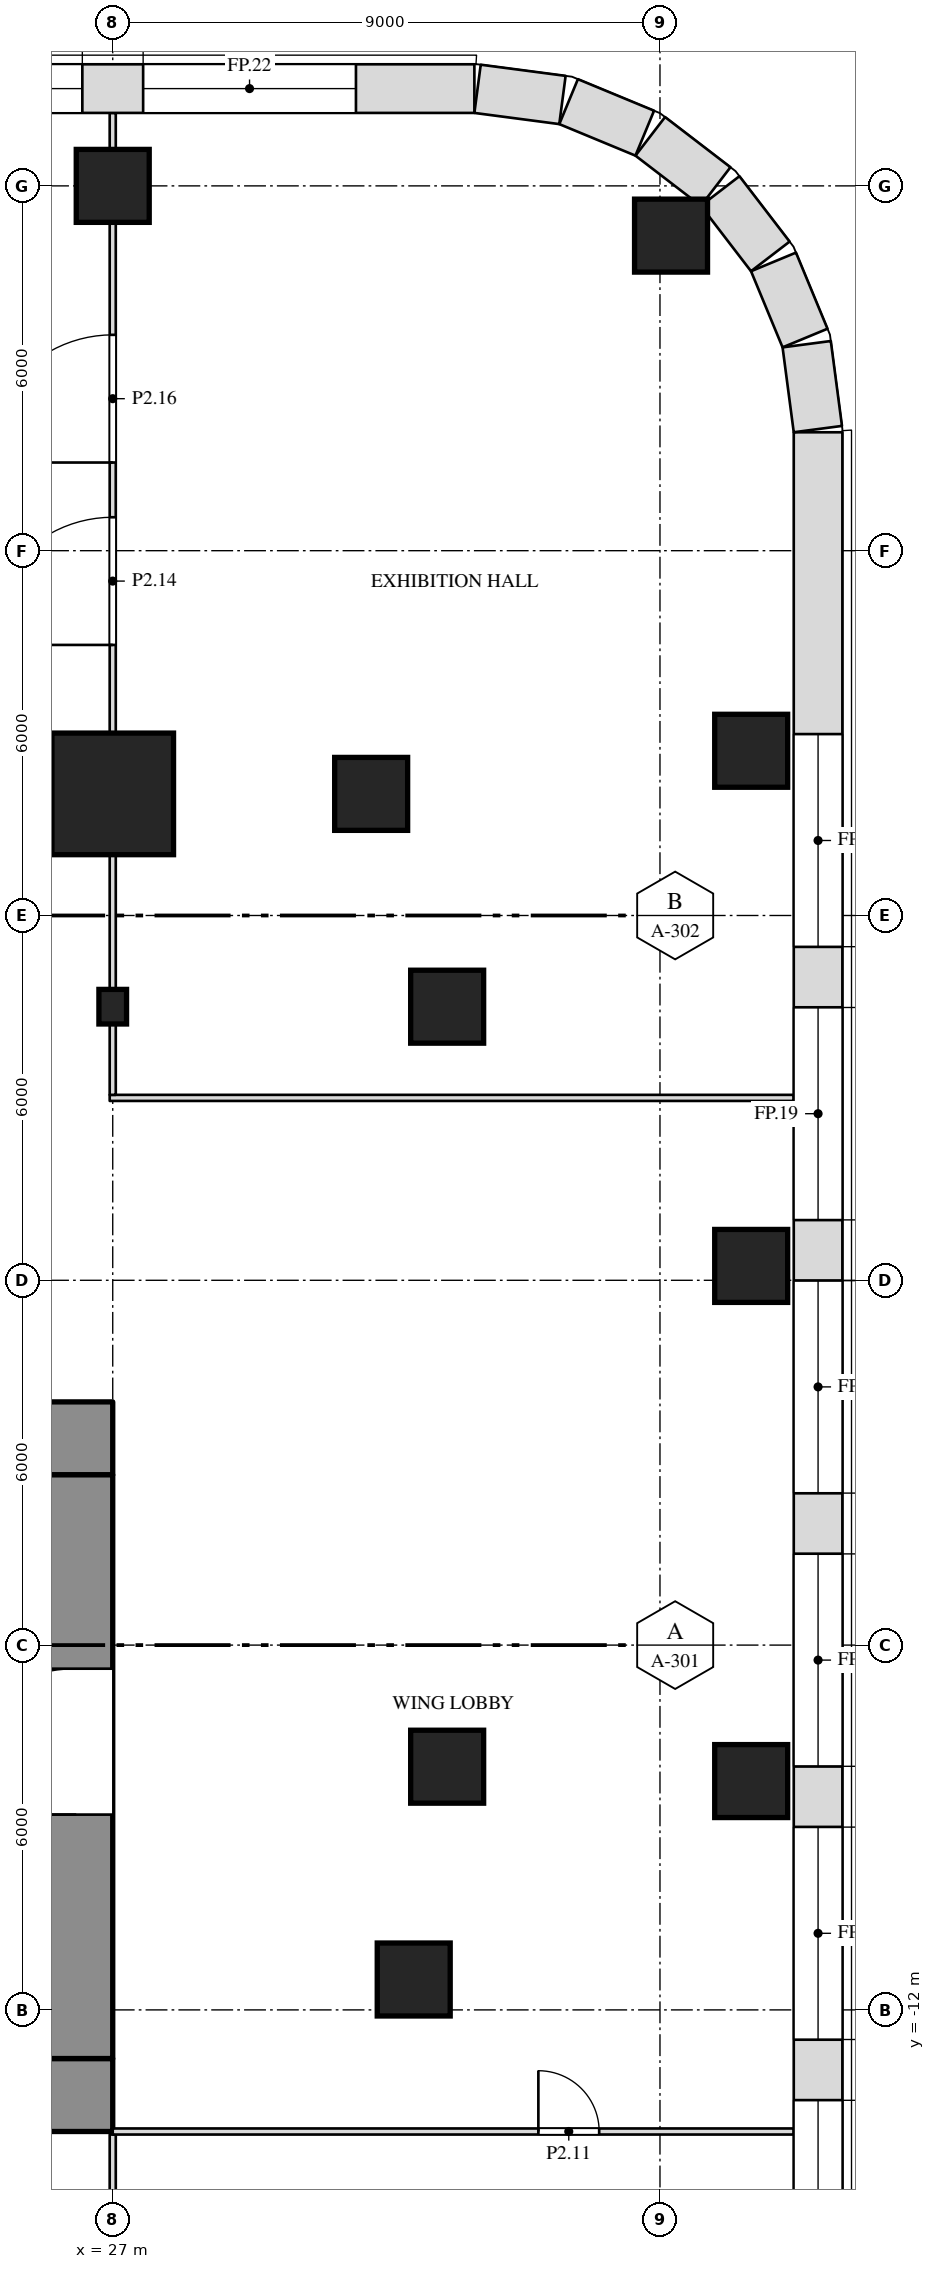
"""IFC4 building model, lengths in metres.
Left out: names, types, materials, properties, quantities, classifications, styles, units other than length and angle.
Written with IfcOpenShell. Run it as: python <this file> out.ifc"""

import sys

from ifc_helpers import new_model, si_unit, direction, frame, frame_2d, origin, origin_2d, place, context, subcontext, project, spatial, rectangle, i_section, extrude, element, fill, save


model = new_model("IFC4")
c1 = context("Model", 3, precision=1e-05, world=origin(), true_north=direction((0.0, 1.0)))
c2 = subcontext(c1, "Body", "Model", "MODEL_VIEW")
j1 = project(units=[si_unit("LENGTHUNIT", "METRE"), si_unit("PLANEANGLEUNIT", "RADIAN")], contexts=[c1])
p1 = place(None, origin())
s1 = spatial("IfcSite", under=j1, at=p1, CompositionType="ELEMENT")
p2 = place(p1, origin())
s2 = spatial("IfcBuilding", under=s1, at=p2, CompositionType="ELEMENT")
p3 = place(p2, frame((0.0, 0.0, 15.0)))
s3 = spatial("IfcBuildingStorey", under=s2, at=p3, CompositionType="ELEMENT", Elevation=15.0)
for number, where, z_axis, x_axis in (
    (1, (31.95, -11.5, 0.0), (0.0, 0.0, 1.0), (1.0, 0.0, 0.0)),
    (2, (37.5, -8.236, 0.0), (0.0, 0.0, 1.0), (1.0, 0.0, 0.0)),
    (3, (32.5, -8.0, 0.0), (0.0, 0.0, 1.0), (1.0, 0.0, 0.0)),
    (4, (37.5, 0.236, 0.0), (0.0, 0.0, 1.0), (1.0, 0.0, 0.0)),
):
    element("IfcColumn", number, at=place(p3, frame(where, z_axis=z_axis, x_axis=x_axis)), inside=s3, PredefinedType="COLUMN", context=c2, shape_type="SweptSolid", body=[
        extrude(rectangle(XDim=1.2, YDim=1.2, at=origin_2d()), origin(), (0.0, 0.0, 1.0), 6.0),
    ])
p4 = place(p3, frame((27.0, 4.5, 0.0), z_axis=(0.0, 0.0, 1.0), x_axis=(1.0, 0.0, 0.0)))
e5 = element("IfcColumn", 5, at=p4, inside=s3, PredefinedType="COLUMN", context=c2, shape_type="SweptSolid", body=[
    extrude(i_section(OverallWidth=0.455, OverallDepth=0.569, WebThickness=0.078, FlangeThickness=0.125, at=origin_2d()), origin(), (0.0, 0.0, 1.0), 6.0),
])
p5 = place(p3, frame((32.5, 4.5, 0.0), z_axis=(0.0, 0.0, 1.0), x_axis=(1.0, 0.0, 0.0)))
e6 = element("IfcColumn", 6, at=p5, inside=s3, PredefinedType="COLUMN", context=c2, shape_type="SweptSolid", body=[
    extrude(rectangle(XDim=1.2, YDim=1.2, at=origin_2d()), origin(), (0.0, 0.0, 1.0), 6.0),
])
p6 = place(p3, frame((27.0, 8.0, 0.0), z_axis=(0.0, 0.0, 1.0), x_axis=(1.0, 0.0, 0.0)))
e7 = element("IfcColumn", 7, at=p6, inside=s3, PredefinedType="COLUMN", context=c2, shape_type="SweptSolid", body=[
    extrude(rectangle(XDim=2.0, YDim=2.0, at=origin_2d()), origin(), (0.0, 0.0, 1.0), 6.0),
])
for number, where, z_axis, x_axis in (
    (8, (31.25, 8.0, 0.0), (0.0, 0.0, 1.0), (1.0, 0.0, 0.0)),
    (9, (37.5, 8.709, 0.0), (0.0, 0.0, 1.0), (1.0, 0.0, 0.0)),
    (10, (36.182, 17.182, 0.0), (0.0, 0.0, 1.0), (1.0, 0.0, 0.0)),
    (11, (27.0, 18.0, 0.0), (0.0, 0.0, 1.0), (1.0, 0.0, 0.0)),
):
    element("IfcColumn", number, at=place(p3, frame(where, z_axis=z_axis, x_axis=x_axis)), inside=s3, PredefinedType="COLUMN", context=c2, shape_type="SweptSolid", body=[
        extrude(rectangle(XDim=1.2, YDim=1.2, at=origin_2d()), origin(), (0.0, 0.0, 1.0), 6.0),
    ])
p7 = place(p3, frame((-27.0, -2.6, 0.0), z_axis=(0.0, 0.0, 1.0), x_axis=(1.0, 0.0, 0.0)))
e12 = element("IfcWall", 12, at=p7, inside=s3, PredefinedType="SHEAR", context=c2, shape_type="SweptSolid", body=[
    extrude(rectangle(XDim=54.0, YDim=1.2, at=frame_2d((27.0, 0.0))), origin(), (0.0, 0.0, 1.0), 5.7),
])
p8 = place(p3, frame((-27.0, -13.4, 0.0), z_axis=(0.0, 0.0, 1.0), x_axis=(1.0, 0.0, 0.0)))
e13 = element("IfcWall", 13, at=p8, inside=s3, PredefinedType="SHEAR", context=c2, shape_type="SweptSolid", body=[
    extrude(rectangle(XDim=54.0, YDim=1.2, at=frame_2d((27.0, 0.0))), origin(), (0.0, 0.0, 1.0), 5.7),
])
p9 = place(p8, frame((16.45, 0.0, 0.0)))
e14 = element("IfcOpeningElement", 14, at=p9, cuts=e13, PredefinedType="OPENING", context=c2, shape_type="SweptSolid", body=[
    extrude(rectangle(XDim=1.0, YDim=2.1, at=frame_2d((0.5, 1.05))), frame((0.0, 0.612, 0.0), z_axis=(0.0, -1.0, 0.0), x_axis=(1.0, 0.0, 0.0)), (0.0, 0.0, 1.0), 1.224),
])
p10 = place(p8, frame((36.55, 0.0, 0.0)))
e15 = element("IfcOpeningElement", 15, at=p10, cuts=e13, PredefinedType="OPENING", context=c2, shape_type="SweptSolid", body=[
    extrude(rectangle(XDim=1.0, YDim=2.1, at=frame_2d((0.5, 1.05))), frame((0.0, 0.612, 0.0), z_axis=(0.0, -1.0, 0.0), x_axis=(1.0, 0.0, 0.0)), (0.0, 0.0, 1.0), 1.224),
])
p11 = place(p3, frame((26.4, -12.8, 0.0), z_axis=(0.0, 0.0, 1.0), x_axis=(0.0, 1.0, 0.0)))
e16 = element("IfcWall", 16, at=p11, inside=s3, PredefinedType="SHEAR", context=c2, shape_type="SweptSolid", body=[
    extrude(rectangle(XDim=9.6, YDim=1.2, at=frame_2d((4.8, 0.0))), origin(), (0.0, 0.0, 1.0), 5.7),
])
p12 = place(p11, frame((4.012, 0.0, 0.0)))
e17 = element("IfcOpeningElement", 17, at=p12, cuts=e16, PredefinedType="OPENING", context=c2, shape_type="SweptSolid", body=[
    extrude(rectangle(XDim=2.4, YDim=2.1, at=frame_2d((1.2, 1.05))), frame((0.0, 0.612, 0.0), z_axis=(0.0, -1.0, 0.0), x_axis=(1.0, 0.0, 0.0)), (0.0, 0.0, 1.0), 1.224),
])
p13 = place(p3, frame((27.0, -16.9, 0.0), z_axis=(0.0, 0.0, 1.0), x_axis=(0.0, 1.0, 0.0)))
e18 = element("IfcWall", 18, at=p13, inside=s3, PredefinedType="PARTITIONING", context=c2, shape_type="SweptSolid", body=[
    extrude(rectangle(XDim=2.85, YDim=0.1, at=frame_2d((1.425, 0.0))), origin(), (0.0, 0.0, 1.0), 5.088),
])
p14 = place(p3, frame((27.0, -14.0, 0.0), z_axis=(0.0, 0.0, 1.0), x_axis=(1.0, 0.0, 0.0)))
e19 = element("IfcWall", 19, at=p14, inside=s3, PredefinedType="PARTITIONING", context=c2, shape_type="SweptSolid", body=[
    extrude(rectangle(XDim=11.2, YDim=0.1, at=frame_2d((5.6, 0.0))), origin(), (0.0, 0.0, 1.0), 5.7),
])
p15 = place(p14, frame((7.0, 0.0, 0.0)))
e20 = element("IfcOpeningElement", 20, at=p15, cuts=e19, PredefinedType="OPENING", context=c2, shape_type="SweptSolid", body=[
    extrude(rectangle(XDim=1.0, YDim=2.1, at=frame_2d((0.5, 1.05))), frame((0.0, 0.062, 0.0), z_axis=(0.0, -1.0, 0.0), x_axis=(1.0, 0.0, 0.0)), (0.0, 0.0, 1.0), 0.124),
])
p16 = place(p3, frame((26.95, 3.0, 0.0), z_axis=(0.0, 0.0, 1.0), x_axis=(1.0, 0.0, 0.0)))
e21 = element("IfcWall", 21, at=p16, inside=s3, PredefinedType="PARTITIONING", context=c2, shape_type="SweptSolid", body=[
    extrude(rectangle(XDim=11.25, YDim=0.1, at=frame_2d((5.625, 0.0))), origin(), (0.0, 0.0, 1.0), 5.7),
])
p17 = place(p3, frame((27.0, 3.05, 0.0), z_axis=(0.0, 0.0, 1.0), x_axis=(0.0, 1.0, 0.0)))
e22 = element("IfcWall", 22, at=p17, inside=s3, PredefinedType="PARTITIONING", context=c2, shape_type="SweptSolid", body=[
    extrude(rectangle(XDim=1.166, YDim=0.1, at=frame_2d((0.583, 0.0))), origin(), (0.0, 0.0, 1.0), 5.088),
])
p18 = place(p3, frame((27.0, 4.784, 0.0), z_axis=(0.0, 0.0, 1.0), x_axis=(0.0, 1.0, 0.0)))
e23 = element("IfcWall", 23, at=p18, inside=s3, PredefinedType="PARTITIONING", context=c2, shape_type="SweptSolid", body=[
    extrude(rectangle(XDim=2.216, YDim=0.1, at=frame_2d((1.108, 0.0))), origin(), (0.0, 0.0, 1.0), 5.088),
])
p19 = place(p3, frame((27.0, 9.0, 0.0), z_axis=(0.0, 0.0, 1.0), x_axis=(0.0, 1.0, 0.0)))
e24 = element("IfcWall", 24, at=p19, inside=s3, PredefinedType="PARTITIONING", context=c2, shape_type="SweptSolid", body=[
    extrude(rectangle(XDim=8.4, YDim=0.1, at=frame_2d((4.2, 0.0))), origin(), (0.0, 0.0, 1.0), 5.088),
])
p20 = place(p19, frame((1.45, 0.0, 0.0)))
e25 = element("IfcOpeningElement", 25, at=p20, cuts=e24, PredefinedType="OPENING", context=c2, shape_type="SweptSolid", body=[
    extrude(rectangle(XDim=2.1, YDim=2.4, at=frame_2d((1.05, 1.2))), frame((0.0, 0.062, 0.0), z_axis=(0.0, -1.0, 0.0), x_axis=(1.0, 0.0, 0.0)), (0.0, 0.0, 1.0), 0.124),
])
p21 = place(p19, frame((4.45, 0.0, 0.0)))
e26 = element("IfcOpeningElement", 26, at=p21, cuts=e24, PredefinedType="OPENING", context=c2, shape_type="SweptSolid", body=[
    extrude(rectangle(XDim=2.1, YDim=2.4, at=frame_2d((1.05, 1.2))), frame((0.0, 0.062, 0.0), z_axis=(0.0, -1.0, 0.0), x_axis=(1.0, 0.0, 0.0)), (0.0, 0.0, 1.0), 0.124),
])
p22 = place(p3, frame((27.0, 18.6, 0.0), z_axis=(0.0, 0.0, 1.0), x_axis=(0.0, 1.0, 0.0)))
e27 = element("IfcWall", 27, at=p22, inside=s3, PredefinedType="PARTITIONING", context=c2, shape_type="SweptSolid", body=[
    extrude(rectangle(XDim=0.6, YDim=0.1, at=frame_2d((0.3, 0.0))), origin(), (0.0, 0.0, 1.0), 5.7),
])
p23 = place(p3, frame((38.6, -21.948, 0.0), z_axis=(0.0, 0.0, 1.0), x_axis=(0.0, 1.0, 0.0)))
e28 = element("IfcWall", 28, at=p23, inside=s3, PredefinedType="SOLIDWALL", context=c2, shape_type="SweptSolid", body=[
    extrude(rectangle(XDim=35.895, YDim=0.8, at=frame_2d((17.948, 0.0))), origin(), (0.0, 0.0, 1.0), 5.7),
])
p24 = place(p23, frame((4.964, 0.0, 1.0)))
e29 = element("IfcOpeningElement", 29, at=p24, cuts=e28, PredefinedType="OPENING", context=c2, shape_type="SweptSolid", body=[
    extrude(rectangle(XDim=3.5, YDim=4.0, at=frame_2d((1.75, 2.0))), frame((0.0, 0.412, 0.0), z_axis=(0.0, -1.0, 0.0), x_axis=(1.0, 0.0, 0.0)), (0.0, 0.0, 1.0), 0.824),
])
p25 = place(p23, frame((9.458, 0.0, 1.0)))
e30 = element("IfcOpeningElement", 30, at=p25, cuts=e28, PredefinedType="OPENING", context=c2, shape_type="SweptSolid", body=[
    extrude(rectangle(XDim=3.5, YDim=4.0, at=frame_2d((1.75, 2.0))), frame((0.0, 0.412, 0.0), z_axis=(0.0, -1.0, 0.0), x_axis=(1.0, 0.0, 0.0)), (0.0, 0.0, 1.0), 0.824),
])
p26 = place(p23, frame((13.951, 0.0, 1.0)))
e31 = element("IfcOpeningElement", 31, at=p26, cuts=e28, PredefinedType="OPENING", context=c2, shape_type="SweptSolid", body=[
    extrude(rectangle(XDim=3.5, YDim=4.0, at=frame_2d((1.75, 2.0))), frame((0.0, 0.412, 0.0), z_axis=(0.0, -1.0, 0.0), x_axis=(1.0, 0.0, 0.0)), (0.0, 0.0, 1.0), 0.824),
])
p27 = place(p23, frame((18.444, 0.0, 1.0)))
e32 = element("IfcOpeningElement", 32, at=p27, cuts=e28, PredefinedType="OPENING", context=c2, shape_type="SweptSolid", body=[
    extrude(rectangle(XDim=3.5, YDim=4.0, at=frame_2d((1.75, 2.0))), frame((0.0, 0.412, 0.0), z_axis=(0.0, -1.0, 0.0), x_axis=(1.0, 0.0, 0.0)), (0.0, 0.0, 1.0), 0.824),
])
p28 = place(p23, frame((22.938, 0.0, 1.0)))
e33 = element("IfcOpeningElement", 33, at=p28, cuts=e28, PredefinedType="OPENING", context=c2, shape_type="SweptSolid", body=[
    extrude(rectangle(XDim=3.5, YDim=4.0, at=frame_2d((1.75, 2.0))), frame((0.0, 0.412, 0.0), z_axis=(0.0, -1.0, 0.0), x_axis=(1.0, 0.0, 0.0)), (0.0, 0.0, 1.0), 0.824),
])
p29 = place(p23, frame((27.431, 0.0, 1.0)))
e34 = element("IfcOpeningElement", 34, at=p29, cuts=e28, PredefinedType="OPENING", context=c2, shape_type="SweptSolid", body=[
    extrude(rectangle(XDim=3.5, YDim=4.0, at=frame_2d((1.75, 2.0))), frame((0.0, 0.412, 0.0), z_axis=(0.0, -1.0, 0.0), x_axis=(1.0, 0.0, 0.0)), (0.0, 0.0, 1.0), 0.824),
])
p30 = place(p3, frame((38.597, 14.0, 0.0), z_axis=(0.0, 0.0, 1.0), x_axis=(-0.130517283865, 0.99144603414, 0.0)))
e35 = element("IfcWall", 35, at=p30, inside=s3, PredefinedType="SOLIDWALL", context=c2, shape_type="SweptSolid", body=[
    extrude(rectangle(XDim=1.408, YDim=0.8, at=frame_2d((0.704, 0.0))), origin(), (0.0, 0.0, 1.0), 5.7),
])
p31 = place(p3, frame((38.386, 15.497, 0.0), z_axis=(0.0, 0.0, 1.0), x_axis=(-0.38276009378, 0.923847774587, 0.0)))
e36 = element("IfcWall", 36, at=p31, inside=s3, PredefinedType="SOLIDWALL", context=c2, shape_type="SweptSolid", body=[
    extrude(rectangle(XDim=1.355, YDim=0.8, at=frame_2d((0.678, 0.0))), origin(), (0.0, 0.0, 1.0), 5.7),
])
for number, where, z_axis, x_axis in (
    (37, (37.815, 16.84, 0.0), (0.0, 0.0, 1.0), (-0.609, 0.793, 0.0)),
    (38, (36.916, 17.989, 0.0), (0.0, 0.0, 1.0), (-0.793, 0.609, 0.0)),
):
    element("IfcWall", number, at=place(p3, frame(where, z_axis=z_axis, x_axis=x_axis)), inside=s3, PredefinedType="SOLIDWALL", context=c2, shape_type="SweptSolid", body=[
        extrude(rectangle(XDim=1.356, YDim=0.8, at=frame_2d((0.678, 0.0))), origin(), (0.0, 0.0, 1.0), 5.7),
    ])
p32 = place(p3, frame((35.75, 18.867, 0.0), z_axis=(0.0, 0.0, 1.0), x_axis=(-0.923847774587, 0.38276009378, 0.0)))
e39 = element("IfcWall", 39, at=p32, inside=s3, PredefinedType="SOLIDWALL", context=c2, shape_type="SweptSolid", body=[
    extrude(rectangle(XDim=1.355, YDim=0.8, at=frame_2d((0.678, 0.0))), origin(), (0.0, 0.0, 1.0), 5.7),
])
p33 = place(p3, frame((34.396, 19.413, 0.0), z_axis=(0.0, 0.0, 1.0), x_axis=(-0.99144603414, 0.130517283865, 0.0)))
e40 = element("IfcWall", 40, at=p33, inside=s3, PredefinedType="SOLIDWALL", context=c2, shape_type="SweptSolid", body=[
    extrude(rectangle(XDim=1.408, YDim=0.8, at=frame_2d((0.704, 0.0))), origin(), (0.0, 0.0, 1.0), 5.7),
])
p34 = place(p3, frame((32.948, 19.6, 0.0), z_axis=(0.0, 0.0, 1.0), x_axis=(-1.0, 0.0, 0.0)))
e41 = element("IfcWall", 41, at=p34, inside=s3, PredefinedType="SOLIDWALL", context=c2, shape_type="SweptSolid", body=[
    extrude(rectangle(XDim=14.948, YDim=0.8, at=frame_2d((7.474, 0.0))), origin(), (0.0, 0.0, 1.0), 5.7),
])
p35 = place(p34, frame((1.948, 0.0, 1.0)))
e42 = element("IfcOpeningElement", 42, at=p35, cuts=e41, PredefinedType="OPENING", context=c2, shape_type="SweptSolid", body=[
    extrude(rectangle(XDim=3.5, YDim=4.0, at=frame_2d((1.75, 2.0))), frame((0.0, 0.412, 0.0), z_axis=(0.0, -1.0, 0.0), x_axis=(1.0, 0.0, 0.0)), (0.0, 0.0, 1.0), 0.824),
])
p36 = place(p34, frame((6.448, 0.0, 1.0)))
e43 = element("IfcOpeningElement", 43, at=p36, cuts=e41, PredefinedType="OPENING", context=c2, shape_type="SweptSolid", body=[
    extrude(rectangle(XDim=3.5, YDim=4.0, at=frame_2d((1.75, 2.0))), frame((0.0, 0.412, 0.0), z_axis=(0.0, -1.0, 0.0), x_axis=(1.0, 0.0, 0.0)), (0.0, 0.0, 1.0), 0.824),
])
p37 = place(p34, frame((10.948, 0.0, 1.0)))
e44 = element("IfcOpeningElement", 44, at=p37, cuts=e41, PredefinedType="OPENING", context=c2, shape_type="SweptSolid", body=[
    extrude(rectangle(XDim=3.5, YDim=4.0, at=frame_2d((1.75, 2.0))), frame((0.0, 0.412, 0.0), z_axis=(0.0, -1.0, 0.0), x_axis=(1.0, 0.0, 0.0)), (0.0, 0.0, 1.0), 0.824),
])
p38 = place(p15, origin())
e45 = element("IfcDoor", 45, at=p38, inside=s3, OperationType="SINGLE_SWING_LEFT", PredefinedType="DOOR", context=c2, shape_type="SweptSolid", body=[
    extrude(rectangle(XDim=1.0, YDim=2.1, at=frame_2d((0.5, 1.05))), frame((0.0, 0.025, 0.0), z_axis=(0.0, -1.0, 0.0), x_axis=(1.0, 0.0, 0.0)), (0.0, 0.0, 1.0), 0.05),
])
fill(e20, e45)
p39 = place(p20, origin())
e46 = element("IfcDoor", 46, at=p39, inside=s3, OperationType="DOUBLE_DOOR_SINGLE_SWING", PredefinedType="DOOR", context=c2, shape_type="SweptSolid", body=[
    extrude(rectangle(XDim=2.1, YDim=2.4, at=frame_2d((1.05, 1.2))), frame((0.0, 0.025, 0.0), z_axis=(0.0, -1.0, 0.0), x_axis=(1.0, 0.0, 0.0)), (0.0, 0.0, 1.0), 0.05),
])
fill(e25, e46)
p40 = place(p21, origin())
e47 = element("IfcDoor", 47, at=p40, inside=s3, OperationType="DOUBLE_DOOR_SINGLE_SWING", PredefinedType="DOOR", context=c2, shape_type="SweptSolid", body=[
    extrude(rectangle(XDim=2.1, YDim=2.4, at=frame_2d((1.05, 1.2))), frame((0.0, 0.025, 0.0), z_axis=(0.0, -1.0, 0.0), x_axis=(1.0, 0.0, 0.0)), (0.0, 0.0, 1.0), 0.05),
])
fill(e26, e47)
p41 = place(p24, origin())
e48 = element("IfcWindow", 48, at=p41, inside=s3, PartitioningType="SINGLE_PANEL", PredefinedType="WINDOW", context=c2, shape_type="SweptSolid", body=[
    extrude(rectangle(XDim=3.5, YDim=4.0, at=frame_2d((1.75, 2.0))), frame((0.0, 0.03, 0.0), z_axis=(0.0, -1.0, 0.0), x_axis=(1.0, 0.0, 0.0)), (0.0, 0.0, 1.0), 0.06),
])
fill(e29, e48)
p42 = place(p25, origin())
e49 = element("IfcWindow", 49, at=p42, inside=s3, PartitioningType="SINGLE_PANEL", PredefinedType="WINDOW", context=c2, shape_type="SweptSolid", body=[
    extrude(rectangle(XDim=3.5, YDim=4.0, at=frame_2d((1.75, 2.0))), frame((0.0, 0.03, 0.0), z_axis=(0.0, -1.0, 0.0), x_axis=(1.0, 0.0, 0.0)), (0.0, 0.0, 1.0), 0.06),
])
fill(e30, e49)
p43 = place(p26, origin())
e50 = element("IfcWindow", 50, at=p43, inside=s3, PartitioningType="SINGLE_PANEL", PredefinedType="WINDOW", context=c2, shape_type="SweptSolid", body=[
    extrude(rectangle(XDim=3.5, YDim=4.0, at=frame_2d((1.75, 2.0))), frame((0.0, 0.03, 0.0), z_axis=(0.0, -1.0, 0.0), x_axis=(1.0, 0.0, 0.0)), (0.0, 0.0, 1.0), 0.06),
])
fill(e31, e50)
p44 = place(p27, origin())
e51 = element("IfcWindow", 51, at=p44, inside=s3, PartitioningType="SINGLE_PANEL", PredefinedType="WINDOW", context=c2, shape_type="SweptSolid", body=[
    extrude(rectangle(XDim=3.5, YDim=4.0, at=frame_2d((1.75, 2.0))), frame((0.0, 0.03, 0.0), z_axis=(0.0, -1.0, 0.0), x_axis=(1.0, 0.0, 0.0)), (0.0, 0.0, 1.0), 0.06),
])
fill(e32, e51)
p45 = place(p28, origin())
e52 = element("IfcWindow", 52, at=p45, inside=s3, PartitioningType="SINGLE_PANEL", PredefinedType="WINDOW", context=c2, shape_type="SweptSolid", body=[
    extrude(rectangle(XDim=3.5, YDim=4.0, at=frame_2d((1.75, 2.0))), frame((0.0, 0.03, 0.0), z_axis=(0.0, -1.0, 0.0), x_axis=(1.0, 0.0, 0.0)), (0.0, 0.0, 1.0), 0.06),
])
fill(e33, e52)
p46 = place(p29, origin())
e53 = element("IfcWindow", 53, at=p46, inside=s3, PartitioningType="SINGLE_PANEL", PredefinedType="WINDOW", context=c2, shape_type="SweptSolid", body=[
    extrude(rectangle(XDim=3.5, YDim=4.0, at=frame_2d((1.75, 2.0))), frame((0.0, 0.03, 0.0), z_axis=(0.0, -1.0, 0.0), x_axis=(1.0, 0.0, 0.0)), (0.0, 0.0, 1.0), 0.06),
])
fill(e34, e53)
p47 = place(p35, origin())
e54 = element("IfcWindow", 54, at=p47, inside=s3, PartitioningType="SINGLE_PANEL", PredefinedType="WINDOW", context=c2, shape_type="SweptSolid", body=[
    extrude(rectangle(XDim=3.5, YDim=4.0, at=frame_2d((1.75, 2.0))), frame((0.0, 0.03, 0.0), z_axis=(0.0, -1.0, 0.0), x_axis=(1.0, 0.0, 0.0)), (0.0, 0.0, 1.0), 0.06),
])
fill(e42, e54)
p48 = place(p36, origin())
e55 = element("IfcWindow", 55, at=p48, inside=s3, PartitioningType="SINGLE_PANEL", PredefinedType="WINDOW", context=c2, shape_type="SweptSolid", body=[
    extrude(rectangle(XDim=3.5, YDim=4.0, at=frame_2d((1.75, 2.0))), frame((0.0, 0.03, 0.0), z_axis=(0.0, -1.0, 0.0), x_axis=(1.0, 0.0, 0.0)), (0.0, 0.0, 1.0), 0.06),
])
fill(e43, e55)
p49 = place(p12, origin())
e56 = element("IfcDoor", 56, at=p49, inside=s3, OperationType="DOUBLE_DOOR_SINGLE_SWING", PredefinedType="DOOR", context=c2, shape_type="SweptSolid", body=[
    extrude(rectangle(XDim=2.4, YDim=2.1, at=frame_2d((1.2, 1.05))), frame((0.0, 0.025, 0.0), z_axis=(0.0, -1.0, 0.0), x_axis=(1.0, 0.0, 0.0)), (0.0, 0.0, 1.0), 0.05),
])
fill(e17, e56)
save(model, sys.argv[1])
